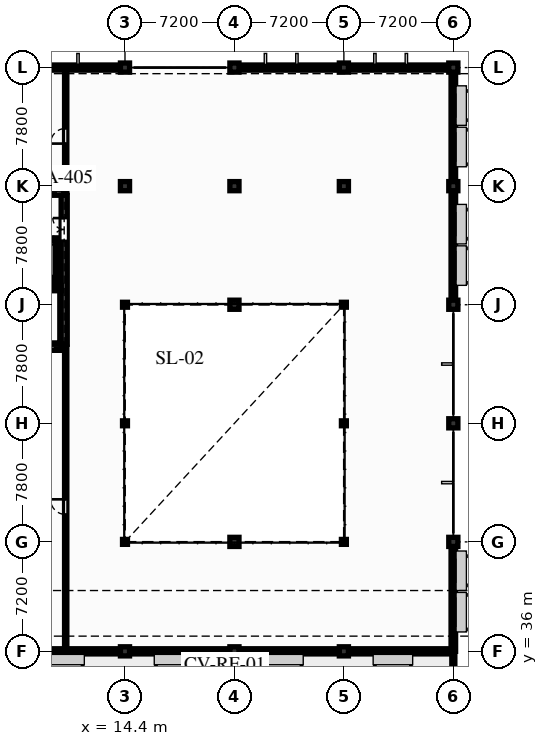
"""IFC4 building model, lengths in metres.
Left out: names, types, materials, properties, quantities, classifications, styles, units other than length and angle.
Written with IfcOpenShell. Run it as: python <this file> out.ifc"""

import sys

from ifc_helpers import new_model, si_unit, direction, frame, frame_2d, origin, origin_2d, place, context, subcontext, project, spatial, rectangle, hollow_circle, extrude, element, fill, save


model = new_model("IFC4")
c1 = context("Model", 3, precision=1e-05, world=origin(), true_north=direction((0.0, 1.0)))
c2 = subcontext(c1, "Body", "Model", "MODEL_VIEW")
j1 = project(units=[si_unit("LENGTHUNIT", "METRE"), si_unit("PLANEANGLEUNIT", "RADIAN")], contexts=[c1])
p1 = place(None, origin())
s1 = spatial("IfcSite", under=j1, at=p1, CompositionType="ELEMENT")
p2 = place(p1, origin())
s2 = spatial("IfcBuilding", under=s1, at=p2, CompositionType="ELEMENT")
p3 = place(p2, frame((0.0, 0.0, 8.94)))
s3 = spatial("IfcBuildingStorey", under=s2, at=p3, CompositionType="ELEMENT", Elevation=8.94)
p4 = place(p3, frame((14.4, 36.0, 0.0), z_axis=(0.0, 0.0, 1.0), x_axis=(1.0, 0.0, 0.0)))
e1 = element("IfcColumn", 1, at=p4, inside=s3, PredefinedType="COLUMN", context=c2, shape_type="SweptSolid", body=[
    extrude(rectangle(XDim=0.6, YDim=0.6, at=origin_2d()), origin(), (0.0, 0.0, 1.0), 3.84),
])
for number, where, z_axis, x_axis in (
    (2, (14.4, 43.2, 0.0), (0.0, 0.0, 1.0), (1.0, 0.0, 0.0)),
    (3, (14.4, 51.0, 0.0), (0.0, 0.0, 1.0), (1.0, 0.0, 0.0)),
    (4, (14.4, 58.8, 0.0), (0.0, 0.0, 1.0), (1.0, 0.0, 0.0)),
):
    element("IfcColumn", number, at=place(p3, frame(where, z_axis=z_axis, x_axis=x_axis)), inside=s3, PredefinedType="COLUMN", context=c2, shape_type="SweptSolid", body=[
        extrude(hollow_circle(Radius=0.162, WallThickness=0.012, at=origin_2d()), origin(), (0.0, 0.0, 1.0), 3.84),
    ])
for number, where, z_axis, x_axis in (
    (5, (14.4, 66.6, 0.0), (0.0, 0.0, 1.0), (1.0, 0.0, 0.0)),
    (6, (14.4, 74.4, 0.0), (0.0, 0.0, 1.0), (1.0, 0.0, 0.0)),
    (7, (21.6, 36.0, 0.0), (0.0, 0.0, 1.0), (1.0, 0.0, 0.0)),
    (8, (21.6, 43.2, 0.0), (0.0, 0.0, 1.0), (1.0, 0.0, 0.0)),
    (9, (21.6, 58.8, 0.0), (0.0, 0.0, 1.0), (1.0, 0.0, 0.0)),
    (10, (21.6, 66.6, 0.0), (0.0, 0.0, 1.0), (1.0, 0.0, 0.0)),
    (11, (21.6, 74.4, 0.0), (0.0, 0.0, 1.0), (1.0, 0.0, 0.0)),
    (12, (28.8, 36.0, 0.0), (0.0, 0.0, 1.0), (1.0, 0.0, 0.0)),
):
    element("IfcColumn", number, at=place(p3, frame(where, z_axis=z_axis, x_axis=x_axis)), inside=s3, PredefinedType="COLUMN", context=c2, shape_type="SweptSolid", body=[
        extrude(rectangle(XDim=0.6, YDim=0.6, at=origin_2d()), origin(), (0.0, 0.0, 1.0), 3.84),
    ])
for number, where, z_axis, x_axis in (
    (13, (28.8, 43.2, 0.0), (0.0, 0.0, 1.0), (1.0, 0.0, 0.0)),
    (14, (28.8, 51.0, 0.0), (0.0, 0.0, 1.0), (1.0, 0.0, 0.0)),
    (15, (28.8, 58.8, 0.0), (0.0, 0.0, 1.0), (1.0, 0.0, 0.0)),
):
    element("IfcColumn", number, at=place(p3, frame(where, z_axis=z_axis, x_axis=x_axis)), inside=s3, PredefinedType="COLUMN", context=c2, shape_type="SweptSolid", body=[
        extrude(hollow_circle(Radius=0.162, WallThickness=0.012, at=origin_2d()), origin(), (0.0, 0.0, 1.0), 3.84),
    ])
for number, where, z_axis, x_axis in (
    (16, (28.8, 66.6, 0.0), (0.0, 0.0, 1.0), (1.0, 0.0, 0.0)),
    (17, (28.8, 74.4, 0.0), (0.0, 0.0, 1.0), (1.0, 0.0, 0.0)),
    (18, (36.0, 43.2, 0.0), (0.0, 0.0, 1.0), (1.0, 0.0, 0.0)),
    (19, (36.0, 51.0, 0.0), (0.0, 0.0, 1.0), (1.0, 0.0, 0.0)),
    (20, (36.0, 58.8, 0.0), (0.0, 0.0, 1.0), (1.0, 0.0, 0.0)),
    (21, (36.0, 66.6, 0.0), (0.0, 0.0, 1.0), (1.0, 0.0, 0.0)),
    (22, (36.0, 74.4, 0.0), (0.0, 0.0, 1.0), (1.0, 0.0, 0.0)),
):
    element("IfcColumn", number, at=place(p3, frame(where, z_axis=z_axis, x_axis=x_axis)), inside=s3, PredefinedType="COLUMN", context=c2, shape_type="SweptSolid", body=[
        extrude(rectangle(XDim=0.6, YDim=0.6, at=origin_2d()), origin(), (0.0, 0.0, 1.0), 3.84),
    ])
p5 = place(p3, frame((36.0, 36.0, 0.0), z_axis=(0.0, 0.0, 1.0), x_axis=(0.0, 1.0, 0.0)))
e23 = element("IfcWall", 23, at=p5, inside=s3, PredefinedType="SOLIDWALL", context=c2, shape_type="SweptSolid", body=[
    extrude(rectangle(XDim=7.2, YDim=0.3, at=frame_2d((3.6, 0.0))), origin(), (0.0, 0.0, 1.0), 3.53),
])
p6 = place(p5, frame((1.6, 0.0, 0.85)))
e24 = element("IfcOpeningElement", 24, at=p6, cuts=e23, PredefinedType="OPENING", context=c2, shape_type="SweptSolid", body=[
    extrude(rectangle(XDim=1.95, YDim=2.1, at=frame_2d((0.975, 1.05))), frame((0.0, 0.16, 0.0), z_axis=(0.0, -1.0, 0.0), x_axis=(1.0, 0.0, 0.0)), (0.0, 0.0, 1.0), 0.32),
])
p7 = place(p5, frame((4.5, 0.0, 0.85)))
e25 = element("IfcOpeningElement", 25, at=p7, cuts=e23, PredefinedType="OPENING", context=c2, shape_type="SweptSolid", body=[
    extrude(rectangle(XDim=1.6, YDim=2.05, at=frame_2d((0.8, 1.025))), frame((0.0, 0.16, 0.0), z_axis=(0.0, -1.0, 0.0), x_axis=(1.0, 0.0, 0.0)), (0.0, 0.0, 1.0), 0.32),
])
p8 = place(p3, frame((36.0, 58.8, 0.0), z_axis=(0.0, 0.0, 1.0), x_axis=(0.0, 1.0, 0.0)))
e26 = element("IfcWall", 26, at=p8, inside=s3, PredefinedType="SOLIDWALL", context=c2, shape_type="SweptSolid", body=[
    extrude(rectangle(XDim=7.8, YDim=0.3, at=frame_2d((3.9, 0.0))), origin(), (0.0, 0.0, 1.0), 3.118),
])
p9 = place(p8, frame((1.6, 0.0, 0.85)))
e27 = element("IfcOpeningElement", 27, at=p9, cuts=e26, PredefinedType="OPENING", context=c2, shape_type="SweptSolid", body=[
    extrude(rectangle(XDim=1.95, YDim=2.1, at=frame_2d((0.975, 1.05))), frame((0.0, 0.16, 0.0), z_axis=(0.0, -1.0, 0.0), x_axis=(1.0, 0.0, 0.0)), (0.0, 0.0, 1.0), 0.32),
])
p10 = place(p8, frame((4.5, 0.0, 0.85)))
e28 = element("IfcOpeningElement", 28, at=p10, cuts=e26, PredefinedType="OPENING", context=c2, shape_type="SweptSolid", body=[
    extrude(rectangle(XDim=1.6, YDim=2.05, at=frame_2d((0.8, 1.025))), frame((0.0, 0.16, 0.0), z_axis=(0.0, -1.0, 0.0), x_axis=(1.0, 0.0, 0.0)), (0.0, 0.0, 1.0), 0.32),
])
p11 = place(p3, frame((36.0, 66.6, 0.0), z_axis=(0.0, 0.0, 1.0), x_axis=(0.0, 1.0, 0.0)))
e29 = element("IfcWall", 29, at=p11, inside=s3, PredefinedType="SOLIDWALL", context=c2, shape_type="SweptSolid", body=[
    extrude(rectangle(XDim=7.8, YDim=0.3, at=frame_2d((3.9, 0.0))), origin(), (0.0, 0.0, 1.0), 3.118),
])
p12 = place(p11, frame((1.6, 0.0, 0.85)))
e30 = element("IfcOpeningElement", 30, at=p12, cuts=e29, PredefinedType="OPENING", context=c2, shape_type="SweptSolid", body=[
    extrude(rectangle(XDim=1.95, YDim=2.1, at=frame_2d((0.975, 1.05))), frame((0.0, 0.16, 0.0), z_axis=(0.0, -1.0, 0.0), x_axis=(1.0, 0.0, 0.0)), (0.0, 0.0, 1.0), 0.32),
])
p13 = place(p11, frame((4.5, 0.0, 0.85)))
e31 = element("IfcOpeningElement", 31, at=p13, cuts=e29, PredefinedType="OPENING", context=c2, shape_type="SweptSolid", body=[
    extrude(rectangle(XDim=1.6, YDim=2.05, at=frame_2d((0.8, 1.025))), frame((0.0, 0.16, 0.0), z_axis=(0.0, -1.0, 0.0), x_axis=(1.0, 0.0, 0.0)), (0.0, 0.0, 1.0), 0.32),
])
p14 = place(p3, frame((7.2, 74.4, 0.0), z_axis=(0.0, 0.0, 1.0), x_axis=(1.0, 0.0, 0.0)))
e32 = element("IfcWall", 32, at=p14, inside=s3, PredefinedType="SOLIDWALL", context=c2, shape_type="SweptSolid", body=[
    extrude(rectangle(XDim=7.2, YDim=0.34, at=frame_2d((3.6, 0.0))), origin(), (0.0, 0.0, 1.0), 3.53),
])
p15 = place(p14, frame((4.4, 0.0, 0.9)))
e33 = element("IfcOpeningElement", 33, at=p15, cuts=e32, PredefinedType="OPENING", context=c2, shape_type="SweptSolid", body=[
    extrude(rectangle(XDim=1.75, YDim=2.15, at=frame_2d((0.875, 1.075))), frame((0.0, 0.18, 0.0), z_axis=(0.0, -1.0, 0.0), x_axis=(1.0, 0.0, 0.0)), (0.0, 0.0, 1.0), 0.36),
])
p16 = place(p3, frame((7.2, 36.0, 0.0), z_axis=(0.0, 0.0, 1.0), x_axis=(1.0, 0.0, 0.0)))
e34 = element("IfcWall", 34, at=p16, inside=s3, PredefinedType="SOLIDWALL", context=c2, shape_type="SweptSolid", body=[
    extrude(rectangle(XDim=7.2, YDim=0.34, at=frame_2d((3.6, 0.0))), origin(), (0.0, 0.0, 1.0), 3.53),
])
p17 = place(p16, frame((4.4, 0.0, 0.9)))
e35 = element("IfcOpeningElement", 35, at=p17, cuts=e34, PredefinedType="OPENING", context=c2, shape_type="SweptSolid", body=[
    extrude(rectangle(XDim=2.05, YDim=1.85, at=frame_2d((1.025, 0.925))), frame((0.0, 0.18, 0.0), z_axis=(0.0, -1.0, 0.0), x_axis=(1.0, 0.0, 0.0)), (0.0, 0.0, 1.0), 0.36),
])
p18 = place(p3, frame((14.4, 36.0, 0.0), z_axis=(0.0, 0.0, 1.0), x_axis=(1.0, 0.0, 0.0)))
e36 = element("IfcWall", 36, at=p18, inside=s3, PredefinedType="SOLIDWALL", context=c2, shape_type="SweptSolid", body=[
    extrude(rectangle(XDim=7.2, YDim=0.34, at=frame_2d((3.6, 0.0))), origin(), (0.0, 0.0, 1.0), 3.53),
])
p19 = place(p18, frame((2.2, 0.0, 0.9)))
e37 = element("IfcOpeningElement", 37, at=p19, cuts=e36, PredefinedType="OPENING", context=c2, shape_type="SweptSolid", body=[
    extrude(rectangle(XDim=2.05, YDim=1.85, at=frame_2d((1.025, 0.925))), frame((0.0, 0.18, 0.0), z_axis=(0.0, -1.0, 0.0), x_axis=(1.0, 0.0, 0.0)), (0.0, 0.0, 1.0), 0.36),
])
p20 = place(p3, frame((21.6, 74.4, 0.0), z_axis=(0.0, 0.0, 1.0), x_axis=(1.0, 0.0, 0.0)))
e38 = element("IfcWall", 38, at=p20, inside=s3, PredefinedType="SOLIDWALL", context=c2, shape_type="SweptSolid", body=[
    extrude(rectangle(XDim=7.2, YDim=0.34, at=frame_2d((3.6, 0.0))), origin(), (0.0, 0.0, 1.0), 3.53),
])
p21 = place(p20, frame((2.2, 0.0, 0.9)))
e39 = element("IfcOpeningElement", 39, at=p21, cuts=e38, PredefinedType="OPENING", context=c2, shape_type="SweptSolid", body=[
    extrude(rectangle(XDim=1.75, YDim=2.15, at=frame_2d((0.875, 1.075))), frame((0.0, 0.18, 0.0), z_axis=(0.0, -1.0, 0.0), x_axis=(1.0, 0.0, 0.0)), (0.0, 0.0, 1.0), 0.36),
])
p22 = place(p3, frame((21.6, 36.0, 0.0), z_axis=(0.0, 0.0, 1.0), x_axis=(1.0, 0.0, 0.0)))
e40 = element("IfcWall", 40, at=p22, inside=s3, PredefinedType="SOLIDWALL", context=c2, shape_type="SweptSolid", body=[
    extrude(rectangle(XDim=7.2, YDim=0.34, at=frame_2d((3.6, 0.0))), origin(), (0.0, 0.0, 1.0), 3.53),
])
p23 = place(p22, frame((2.2, 0.0, 0.9)))
e41 = element("IfcOpeningElement", 41, at=p23, cuts=e40, PredefinedType="OPENING", context=c2, shape_type="SweptSolid", body=[
    extrude(rectangle(XDim=2.05, YDim=1.85, at=frame_2d((1.025, 0.925))), frame((0.0, 0.18, 0.0), z_axis=(0.0, -1.0, 0.0), x_axis=(1.0, 0.0, 0.0)), (0.0, 0.0, 1.0), 0.36),
])
p24 = place(p3, frame((28.8, 74.4, 0.0), z_axis=(0.0, 0.0, 1.0), x_axis=(1.0, 0.0, 0.0)))
e42 = element("IfcWall", 42, at=p24, inside=s3, PredefinedType="SOLIDWALL", context=c2, shape_type="SweptSolid", body=[
    extrude(rectangle(XDim=7.2, YDim=0.34, at=frame_2d((3.6, 0.0))), origin(), (0.0, 0.0, 1.0), 3.53),
])
p25 = place(p24, frame((2.2, 0.0, 0.9)))
e43 = element("IfcOpeningElement", 43, at=p25, cuts=e42, PredefinedType="OPENING", context=c2, shape_type="SweptSolid", body=[
    extrude(rectangle(XDim=1.75, YDim=2.15, at=frame_2d((0.875, 1.075))), frame((0.0, 0.18, 0.0), z_axis=(0.0, -1.0, 0.0), x_axis=(1.0, 0.0, 0.0)), (0.0, 0.0, 1.0), 0.36),
])
p26 = place(p3, frame((28.8, 36.0, 0.0), z_axis=(0.0, 0.0, 1.0), x_axis=(1.0, 0.0, 0.0)))
e44 = element("IfcWall", 44, at=p26, inside=s3, PredefinedType="SOLIDWALL", context=c2, shape_type="SweptSolid", body=[
    extrude(rectangle(XDim=7.2, YDim=0.34, at=frame_2d((3.6, 0.0))), origin(), (0.0, 0.0, 1.0), 3.53),
])
p27 = place(p26, frame((2.2, 0.0, 0.9)))
e45 = element("IfcOpeningElement", 45, at=p27, cuts=e44, PredefinedType="OPENING", context=c2, shape_type="SweptSolid", body=[
    extrude(rectangle(XDim=2.05, YDim=1.85, at=frame_2d((1.025, 0.925))), frame((0.0, 0.18, 0.0), z_axis=(0.0, -1.0, 0.0), x_axis=(1.0, 0.0, 0.0)), (0.0, 0.0, 1.0), 0.36),
])
p28 = place(p3, frame((36.0, 32.2, 0.0), z_axis=(0.0, 0.0, 1.0), x_axis=(0.0, 1.0, 0.0)))
e46 = element("IfcWall", 46, at=p28, inside=s3, PredefinedType="PARAPET", context=c2, shape_type="SweptSolid", body=[
    extrude(rectangle(XDim=3.6, YDim=0.2, at=frame_2d((1.8, 0.0))), origin(), (0.0, 0.0, 1.0), 0.72),
])
for number, where, z_axis, x_axis in (
    (47, (0.17, 56.0, 0.0), (0.0, 0.0, 1.0), (1.0, 0.0, 0.0)),
    (48, (0.17, 66.2, 0.0), (0.0, 0.0, 1.0), (1.0, 0.0, 0.0)),
):
    element("IfcWall", number, at=place(p3, frame(where, z_axis=z_axis, x_axis=x_axis)), inside=s3, PredefinedType="SHEAR", context=c2, shape_type="SweptSolid", body=[
        extrude(rectangle(XDim=10.23, YDim=0.4, at=frame_2d((5.115, 0.0))), origin(), (0.0, 0.0, 1.0), 3.53),
    ])
p29 = place(p3, frame((10.4, 56.2, 0.0), z_axis=(0.0, 0.0, 1.0), x_axis=(0.0, 1.0, 0.0)))
e49 = element("IfcWall", 49, at=p29, inside=s3, PredefinedType="SHEAR", context=c2, shape_type="SweptSolid", body=[
    extrude(rectangle(XDim=9.8, YDim=0.4, at=frame_2d((4.9, 0.0))), origin(), (0.0, 0.0, 1.0), 3.53),
])
p30 = place(p29, frame((6.8, 0.0, 0.0)))
e50 = element("IfcOpeningElement", 50, at=p30, cuts=e49, PredefinedType="OPENING", context=c2, shape_type="SweptSolid", body=[
    extrude(rectangle(XDim=1.5, YDim=2.2, at=frame_2d((0.75, 1.1))), frame((0.0, 0.21, 0.0), z_axis=(0.0, -1.0, 0.0), x_axis=(1.0, 0.0, 0.0)), (0.0, 0.0, 1.0), 0.42),
])
p31 = place(p3, frame((0.17, 59.895, 0.0), z_axis=(0.0, 0.0, 1.0), x_axis=(1.0, 0.0, 0.0)))
e51 = element("IfcWall", 51, at=p31, inside=s3, PredefinedType="SHEAR", context=c2, shape_type="SweptSolid", body=[
    extrude(rectangle(XDim=10.03, YDim=0.35, at=frame_2d((5.015, 0.0))), origin(), (0.0, 0.0, 1.0), 3.53),
])
p32 = place(p31, frame((0.45, 0.0, 0.0)))
e52 = element("IfcOpeningElement", 52, at=p32, cuts=e51, PredefinedType="OPENING", context=c2, shape_type="SweptSolid", body=[
    extrude(rectangle(XDim=1.05, YDim=2.2, at=frame_2d((0.525, 1.1))), frame((0.0, 0.185, 0.0), z_axis=(0.0, -1.0, 0.0), x_axis=(1.0, 0.0, 0.0)), (0.0, 0.0, 1.0), 0.37),
])
p33 = place(p3, frame((7.9, 60.5, 0.0), z_axis=(0.0, 0.0, 1.0), x_axis=(1.0, 0.0, 0.0)))
e53 = element("IfcWall", 53, at=p33, inside=s3, PredefinedType="PARTITIONING", context=c2, shape_type="SweptSolid", body=[
    extrude(rectangle(XDim=2.0, YDim=0.2, at=frame_2d((1.0, 0.0))), origin(), (0.0, 0.0, 1.0), 3.53),
])
p34 = place(p3, frame((7.9, 63.1, 0.0), z_axis=(0.0, 0.0, 1.0), x_axis=(1.0, 0.0, 0.0)))
e54 = element("IfcWall", 54, at=p34, inside=s3, PredefinedType="PARTITIONING", context=c2, shape_type="SweptSolid", body=[
    extrude(rectangle(XDim=2.0, YDim=0.2, at=frame_2d((1.0, 0.0))), origin(), (0.0, 0.0, 1.0), 3.53),
])
p35 = place(p34, frame((0.55, 0.0, 0.0)))
e55 = element("IfcOpeningElement", 55, at=p35, cuts=e54, PredefinedType="OPENING", context=c2, shape_type="SweptSolid", body=[
    extrude(rectangle(XDim=0.9, YDim=2.1, at=frame_2d((0.45, 1.05))), frame((0.0, 0.11, 0.0), z_axis=(0.0, -1.0, 0.0), x_axis=(1.0, 0.0, 0.0)), (0.0, 0.0, 1.0), 0.22),
])
p36 = place(p3, frame((9.9, 60.7, 0.0), z_axis=(0.0, 0.0, 1.0), x_axis=(0.0, 1.0, 0.0)))
e56 = element("IfcWall", 56, at=p36, inside=s3, PredefinedType="PARTITIONING", context=c2, shape_type="SweptSolid", body=[
    extrude(rectangle(XDim=2.2, YDim=0.2, at=frame_2d((1.1, 0.0))), origin(), (0.0, 0.0, 1.0), 3.53),
])
p37 = place(p3, frame((10.5, 36.0, 0.0), z_axis=(0.0, 0.0, 1.0), x_axis=(0.0, 1.0, 0.0)))
e57 = element("IfcWall", 57, at=p37, inside=s3, PredefinedType="PARTITIONING", context=c2, shape_type="SweptSolid", body=[
    extrude(rectangle(XDim=20.0, YDim=0.15, at=frame_2d((10.0, 0.0))), origin(), (0.0, 0.0, 1.0), 3.53),
])
p38 = place(p37, frame((9.0, 0.0, 0.0)))
e58 = element("IfcOpeningElement", 58, at=p38, cuts=e57, PredefinedType="OPENING", context=c2, shape_type="SweptSolid", body=[
    extrude(rectangle(XDim=1.0, YDim=2.15, at=frame_2d((0.5, 1.075))), frame((0.0, 0.085, 0.0), z_axis=(0.0, -1.0, 0.0), x_axis=(1.0, 0.0, 0.0)), (0.0, 0.0, 1.0), 0.17),
])
p39 = place(p3, frame((10.5, 66.2, 0.0), z_axis=(0.0, 0.0, 1.0), x_axis=(0.0, 1.0, 0.0)))
e59 = element("IfcWall", 59, at=p39, inside=s3, PredefinedType="PARTITIONING", context=c2, shape_type="SweptSolid", body=[
    extrude(rectangle(XDim=8.2, YDim=0.15, at=frame_2d((4.1, 0.0))), origin(), (0.0, 0.0, 1.0), 3.53),
])
p40 = place(p39, frame((3.2, 0.0, 0.0)))
e60 = element("IfcOpeningElement", 60, at=p40, cuts=e59, PredefinedType="OPENING", context=c2, shape_type="SweptSolid", body=[
    extrude(rectangle(XDim=1.0, YDim=2.15, at=frame_2d((0.5, 1.075))), frame((0.0, 0.085, 0.0), z_axis=(0.0, -1.0, 0.0), x_axis=(1.0, 0.0, 0.0)), (0.0, 0.0, 1.0), 0.17),
])
p41 = place(p6, origin())
e61 = element("IfcWindow", 61, at=p41, inside=s3, PartitioningType="SINGLE_PANEL", PredefinedType="WINDOW", context=c2, shape_type="SweptSolid", body=[
    extrude(rectangle(XDim=1.95, YDim=2.1, at=frame_2d((0.975, 1.05))), frame((0.0, 0.03, 0.0), z_axis=(0.0, -1.0, 0.0), x_axis=(1.0, 0.0, 0.0)), (0.0, 0.0, 1.0), 0.06),
])
fill(e24, e61)
p42 = place(p7, origin())
e62 = element("IfcWindow", 62, at=p42, inside=s3, PartitioningType="SINGLE_PANEL", PredefinedType="WINDOW", context=c2, shape_type="SweptSolid", body=[
    extrude(rectangle(XDim=1.6, YDim=2.05, at=frame_2d((0.8, 1.025))), frame((0.0, 0.03, 0.0), z_axis=(0.0, -1.0, 0.0), x_axis=(1.0, 0.0, 0.0)), (0.0, 0.0, 1.0), 0.06),
])
fill(e25, e62)
p43 = place(p9, origin())
e63 = element("IfcWindow", 63, at=p43, inside=s3, PartitioningType="SINGLE_PANEL", PredefinedType="WINDOW", context=c2, shape_type="SweptSolid", body=[
    extrude(rectangle(XDim=1.95, YDim=2.1, at=frame_2d((0.975, 1.05))), frame((0.0, 0.03, 0.0), z_axis=(0.0, -1.0, 0.0), x_axis=(1.0, 0.0, 0.0)), (0.0, 0.0, 1.0), 0.06),
])
fill(e27, e63)
p44 = place(p10, origin())
e64 = element("IfcWindow", 64, at=p44, inside=s3, PartitioningType="SINGLE_PANEL", PredefinedType="WINDOW", context=c2, shape_type="SweptSolid", body=[
    extrude(rectangle(XDim=1.6, YDim=2.05, at=frame_2d((0.8, 1.025))), frame((0.0, 0.03, 0.0), z_axis=(0.0, -1.0, 0.0), x_axis=(1.0, 0.0, 0.0)), (0.0, 0.0, 1.0), 0.06),
])
fill(e28, e64)
p45 = place(p12, origin())
e65 = element("IfcWindow", 65, at=p45, inside=s3, PartitioningType="SINGLE_PANEL", PredefinedType="WINDOW", context=c2, shape_type="SweptSolid", body=[
    extrude(rectangle(XDim=1.95, YDim=2.1, at=frame_2d((0.975, 1.05))), frame((0.0, 0.03, 0.0), z_axis=(0.0, -1.0, 0.0), x_axis=(1.0, 0.0, 0.0)), (0.0, 0.0, 1.0), 0.06),
])
fill(e30, e65)
p46 = place(p13, origin())
e66 = element("IfcWindow", 66, at=p46, inside=s3, PartitioningType="SINGLE_PANEL", PredefinedType="WINDOW", context=c2, shape_type="SweptSolid", body=[
    extrude(rectangle(XDim=1.6, YDim=2.05, at=frame_2d((0.8, 1.025))), frame((0.0, 0.03, 0.0), z_axis=(0.0, -1.0, 0.0), x_axis=(1.0, 0.0, 0.0)), (0.0, 0.0, 1.0), 0.06),
])
fill(e31, e66)
p47 = place(p15, origin())
e67 = element("IfcWindow", 67, at=p47, inside=s3, PartitioningType="SINGLE_PANEL", PredefinedType="WINDOW", context=c2, shape_type="SweptSolid", body=[
    extrude(rectangle(XDim=1.75, YDim=2.15, at=frame_2d((0.875, 1.075))), frame((0.0, 0.03, 0.0), z_axis=(0.0, -1.0, 0.0), x_axis=(1.0, 0.0, 0.0)), (0.0, 0.0, 1.0), 0.06),
])
fill(e33, e67)
p48 = place(p17, origin())
e68 = element("IfcWindow", 68, at=p48, inside=s3, PartitioningType="SINGLE_PANEL", PredefinedType="WINDOW", context=c2, shape_type="SweptSolid", body=[
    extrude(rectangle(XDim=2.05, YDim=1.85, at=frame_2d((1.025, 0.925))), frame((0.0, 0.03, 0.0), z_axis=(0.0, -1.0, 0.0), x_axis=(1.0, 0.0, 0.0)), (0.0, 0.0, 1.0), 0.06),
])
fill(e35, e68)
p49 = place(p19, origin())
e69 = element("IfcWindow", 69, at=p49, inside=s3, PartitioningType="SINGLE_PANEL", PredefinedType="WINDOW", context=c2, shape_type="SweptSolid", body=[
    extrude(rectangle(XDim=2.05, YDim=1.85, at=frame_2d((1.025, 0.925))), frame((0.0, 0.03, 0.0), z_axis=(0.0, -1.0, 0.0), x_axis=(1.0, 0.0, 0.0)), (0.0, 0.0, 1.0), 0.06),
])
fill(e37, e69)
p50 = place(p21, origin())
e70 = element("IfcWindow", 70, at=p50, inside=s3, PartitioningType="SINGLE_PANEL", PredefinedType="WINDOW", context=c2, shape_type="SweptSolid", body=[
    extrude(rectangle(XDim=1.75, YDim=2.15, at=frame_2d((0.875, 1.075))), frame((0.0, 0.03, 0.0), z_axis=(0.0, -1.0, 0.0), x_axis=(1.0, 0.0, 0.0)), (0.0, 0.0, 1.0), 0.06),
])
fill(e39, e70)
p51 = place(p23, origin())
e71 = element("IfcWindow", 71, at=p51, inside=s3, PartitioningType="SINGLE_PANEL", PredefinedType="WINDOW", context=c2, shape_type="SweptSolid", body=[
    extrude(rectangle(XDim=2.05, YDim=1.85, at=frame_2d((1.025, 0.925))), frame((0.0, 0.03, 0.0), z_axis=(0.0, -1.0, 0.0), x_axis=(1.0, 0.0, 0.0)), (0.0, 0.0, 1.0), 0.06),
])
fill(e41, e71)
p52 = place(p25, origin())
e72 = element("IfcWindow", 72, at=p52, inside=s3, PartitioningType="SINGLE_PANEL", PredefinedType="WINDOW", context=c2, shape_type="SweptSolid", body=[
    extrude(rectangle(XDim=1.75, YDim=2.15, at=frame_2d((0.875, 1.075))), frame((0.0, 0.03, 0.0), z_axis=(0.0, -1.0, 0.0), x_axis=(1.0, 0.0, 0.0)), (0.0, 0.0, 1.0), 0.06),
])
fill(e43, e72)
p53 = place(p27, origin())
e73 = element("IfcWindow", 73, at=p53, inside=s3, PartitioningType="SINGLE_PANEL", PredefinedType="WINDOW", context=c2, shape_type="SweptSolid", body=[
    extrude(rectangle(XDim=2.05, YDim=1.85, at=frame_2d((1.025, 0.925))), frame((0.0, 0.03, 0.0), z_axis=(0.0, -1.0, 0.0), x_axis=(1.0, 0.0, 0.0)), (0.0, 0.0, 1.0), 0.06),
])
fill(e45, e73)
p54 = place(p30, origin())
e74 = element("IfcDoor", 74, at=p54, inside=s3, OperationType="DOUBLE_DOOR_SINGLE_SWING", PredefinedType="DOOR", context=c2, shape_type="SweptSolid", body=[
    extrude(rectangle(XDim=1.5, YDim=2.2, at=frame_2d((0.75, 1.1))), frame((0.0, 0.025, 0.0), z_axis=(0.0, -1.0, 0.0), x_axis=(1.0, 0.0, 0.0)), (0.0, 0.0, 1.0), 0.05),
])
fill(e50, e74)
p55 = place(p38, origin())
e75 = element("IfcDoor", 75, at=p55, inside=s3, OperationType="SINGLE_SWING_RIGHT", PredefinedType="DOOR", context=c2, shape_type="SweptSolid", body=[
    extrude(rectangle(XDim=1.0, YDim=2.15, at=frame_2d((0.5, 1.075))), frame((0.0, 0.025, 0.0), z_axis=(0.0, -1.0, 0.0), x_axis=(1.0, 0.0, 0.0)), (0.0, 0.0, 1.0), 0.05),
])
fill(e58, e75)
p56 = place(p40, origin())
e76 = element("IfcDoor", 76, at=p56, inside=s3, OperationType="SINGLE_SWING_LEFT", PredefinedType="DOOR", context=c2, shape_type="SweptSolid", body=[
    extrude(rectangle(XDim=1.0, YDim=2.15, at=frame_2d((0.5, 1.075))), frame((0.0, 0.025, 0.0), z_axis=(0.0, -1.0, 0.0), x_axis=(1.0, 0.0, 0.0)), (0.0, 0.0, 1.0), 0.05),
])
fill(e60, e76)
save(model, sys.argv[1])
